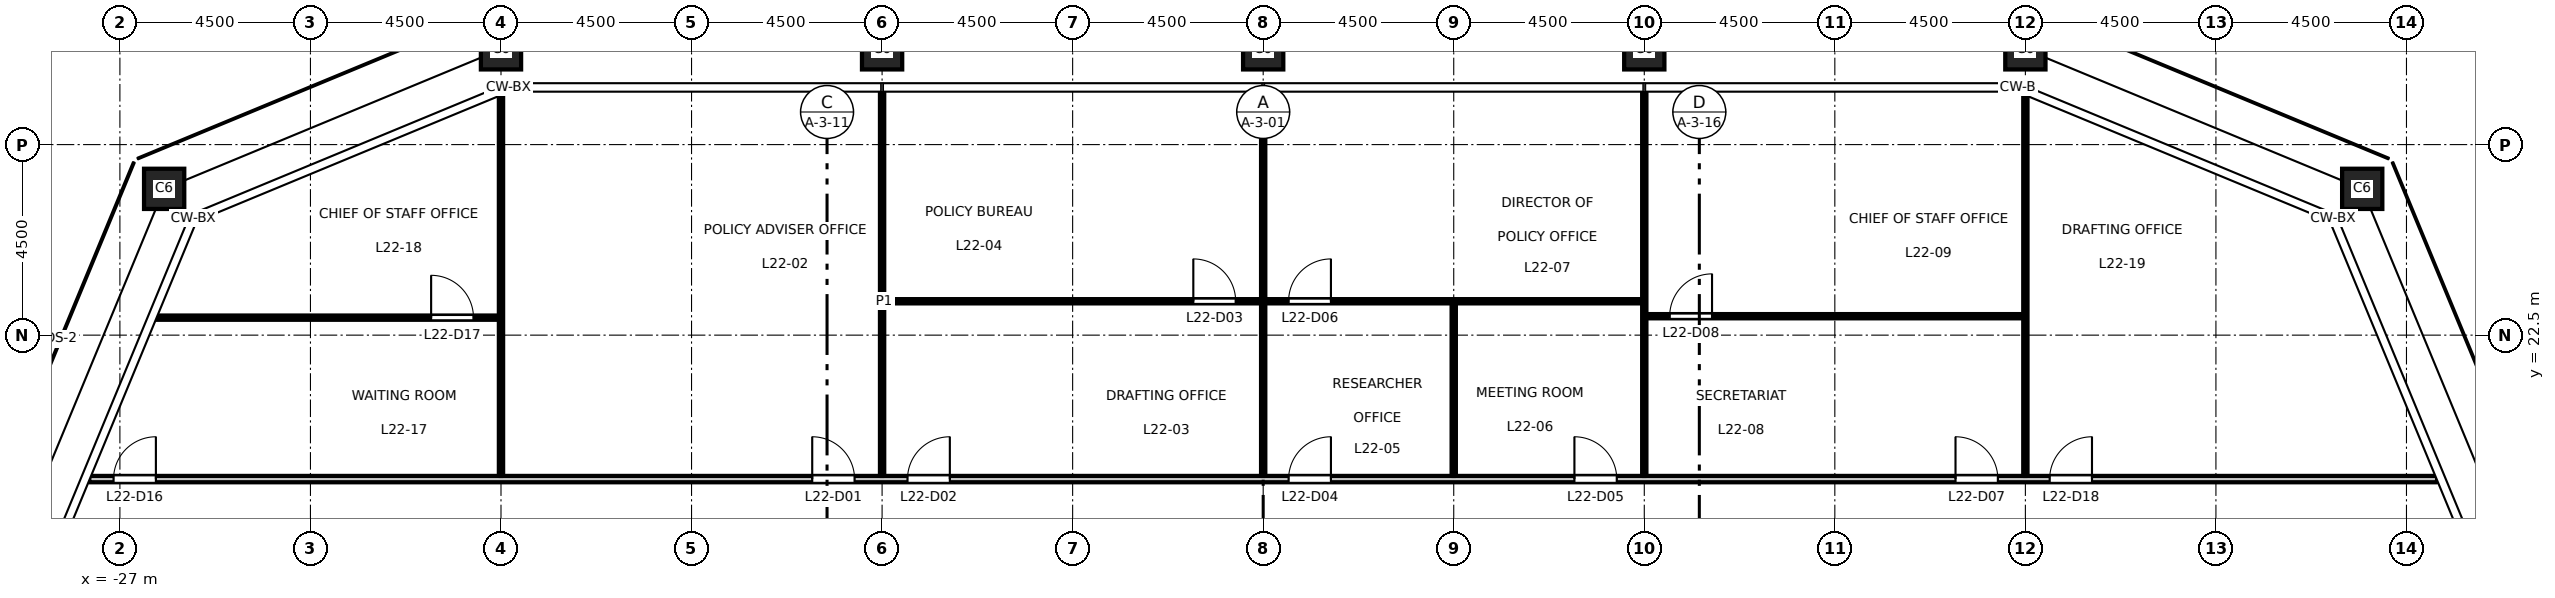
"""IFC4 building model, lengths in metres.
Left out: names, types, materials, properties, quantities, classifications, styles, units other than length and angle.
Written with IfcOpenShell. Run it as: python <this file> out.ifc"""

import sys

from ifc_helpers import new_model, si_unit, direction, frame, frame_2d, origin, origin_2d, place, context, subcontext, project, spatial, rectangle, hollow_rectangle, extrude, element, fill, save


model = new_model("IFC4")
c1 = context("Model", 3, precision=1e-05, world=origin(), true_north=direction((0.0, 1.0)))
c2 = subcontext(c1, "Body", "Model", "MODEL_VIEW")
j1 = project(units=[si_unit("LENGTHUNIT", "METRE"), si_unit("PLANEANGLEUNIT", "RADIAN")], contexts=[c1])
p1 = place(None, origin())
s1 = spatial("IfcSite", under=j1, at=p1, CompositionType="ELEMENT")
p2 = place(p1, origin())
s2 = spatial("IfcBuilding", under=s1, at=p2, CompositionType="ELEMENT")
p3 = place(p2, frame((0.0, 0.0, 104.7)))
s3 = spatial("IfcBuildingStorey", under=s2, at=p3, CompositionType="ELEMENT", Elevation=104.7)
for number, where, z_axis, x_axis in (
    (1, (25.955, 25.955, 0.0), (0.0, 0.0, 1.0), (1.0, 0.0, 0.0)),
    (2, (18.0, 29.25, 0.0), (0.0, 0.0, 1.0), (1.0, 0.0, 0.0)),
    (3, (9.0, 29.25, 0.0), (0.0, 0.0, 1.0), (1.0, 0.0, 0.0)),
    (4, (0.0, 29.25, 0.0), (0.0, 0.0, 1.0), (1.0, 0.0, 0.0)),
    (5, (-9.0, 29.25, 0.0), (0.0, 0.0, 1.0), (1.0, 0.0, 0.0)),
    (6, (-18.0, 29.25, 0.0), (0.0, 0.0, 1.0), (1.0, 0.0, 0.0)),
    (7, (-25.955, 25.955, 0.0), (0.0, 0.0, 1.0), (1.0, 0.0, 0.0)),
):
    element("IfcColumn", number, at=place(p3, frame(where, z_axis=z_axis, x_axis=x_axis)), inside=s3, PredefinedType="COLUMN", context=c2, shape_type="SweptSolid", body=[
        extrude(hollow_rectangle(XDim=0.95, YDim=0.95, WallThickness=0.055, at=origin_2d()), origin(), (0.0, 0.0, 1.0), 4.5),
    ])
p4 = place(p3, frame((-27.723, 19.1, 0.0), z_axis=(0.0, 0.0, 1.0), x_axis=(1.0, 0.0, 0.0)))
e8 = element("IfcWall", 8, at=p4, inside=s3, PredefinedType="PARTITIONING", context=c2, shape_type="SweptSolid", body=[
    extrude(rectangle(XDim=55.446, YDim=0.15, at=frame_2d((27.723, 0.0))), origin(), (0.0, 0.0, 1.0), 4.35),
])
p5 = place(p4, frame((17.073, 0.0, 0.0)))
e9 = element("IfcOpeningElement", 9, at=p5, cuts=e8, PredefinedType="OPENING", context=c2, shape_type="SweptSolid", body=[
    extrude(rectangle(XDim=1.0, YDim=2.1, at=frame_2d((0.5, 1.05))), frame((0.0, 0.085, 0.0), z_axis=(0.0, -1.0, 0.0), x_axis=(1.0, 0.0, 0.0)), (0.0, 0.0, 1.0), 0.17),
])
p6 = place(p4, frame((19.323, 0.0, 0.0)))
e10 = element("IfcOpeningElement", 10, at=p6, cuts=e8, PredefinedType="OPENING", context=c2, shape_type="SweptSolid", body=[
    extrude(rectangle(XDim=1.0, YDim=2.1, at=frame_2d((0.5, 1.05))), frame((0.0, 0.085, 0.0), z_axis=(0.0, -1.0, 0.0), x_axis=(1.0, 0.0, 0.0)), (0.0, 0.0, 1.0), 0.17),
])
p7 = place(p4, frame((28.323, 0.0, 0.0)))
e11 = element("IfcOpeningElement", 11, at=p7, cuts=e8, PredefinedType="OPENING", context=c2, shape_type="SweptSolid", body=[
    extrude(rectangle(XDim=1.0, YDim=2.1, at=frame_2d((0.5, 1.05))), frame((0.0, 0.085, 0.0), z_axis=(0.0, -1.0, 0.0), x_axis=(1.0, 0.0, 0.0)), (0.0, 0.0, 1.0), 0.17),
])
p8 = place(p4, frame((35.073, 0.0, 0.0)))
e12 = element("IfcOpeningElement", 12, at=p8, cuts=e8, PredefinedType="OPENING", context=c2, shape_type="SweptSolid", body=[
    extrude(rectangle(XDim=1.0, YDim=2.1, at=frame_2d((0.5, 1.05))), frame((0.0, 0.085, 0.0), z_axis=(0.0, -1.0, 0.0), x_axis=(1.0, 0.0, 0.0)), (0.0, 0.0, 1.0), 0.17),
])
p9 = place(p4, frame((44.073, 0.0, 0.0)))
e13 = element("IfcOpeningElement", 13, at=p9, cuts=e8, PredefinedType="OPENING", context=c2, shape_type="SweptSolid", body=[
    extrude(rectangle(XDim=1.0, YDim=2.1, at=frame_2d((0.5, 1.05))), frame((0.0, 0.085, 0.0), z_axis=(0.0, -1.0, 0.0), x_axis=(1.0, 0.0, 0.0)), (0.0, 0.0, 1.0), 0.17),
])
p10 = place(p4, frame((0.573, 0.0, 0.0)))
e14 = element("IfcOpeningElement", 14, at=p10, cuts=e8, PredefinedType="OPENING", context=c2, shape_type="SweptSolid", body=[
    extrude(rectangle(XDim=1.0, YDim=2.1, at=frame_2d((0.5, 1.05))), frame((0.0, 0.085, 0.0), z_axis=(0.0, -1.0, 0.0), x_axis=(1.0, 0.0, 0.0)), (0.0, 0.0, 1.0), 0.17),
])
p11 = place(p4, frame((46.296, 0.0, 0.0)))
e15 = element("IfcOpeningElement", 15, at=p11, cuts=e8, PredefinedType="OPENING", context=c2, shape_type="SweptSolid", body=[
    extrude(rectangle(XDim=1.0, YDim=2.1, at=frame_2d((0.5, 1.05))), frame((0.0, 0.085, 0.0), z_axis=(0.0, -1.0, 0.0), x_axis=(1.0, 0.0, 0.0)), (0.0, 0.0, 1.0), 0.17),
])
p12 = place(p3, frame((-26.143, 22.913, 0.0), z_axis=(0.0, 0.0, 1.0), x_axis=(1.0, 0.0, 0.0)))
e16 = element("IfcWall", 16, at=p12, inside=s3, PredefinedType="PARTITIONING", context=c2, shape_type="SweptSolid", body=[
    extrude(rectangle(XDim=8.093, YDim=0.1, at=frame_2d((4.046, 0.0))), origin(), (0.0, 0.0, 1.0), 4.35),
])
p13 = place(p12, frame((6.493, 0.0, 0.0)))
e17 = element("IfcOpeningElement", 17, at=p13, cuts=e16, PredefinedType="OPENING", context=c2, shape_type="SweptSolid", body=[
    extrude(rectangle(XDim=1.0, YDim=2.1, at=frame_2d((0.5, 1.05))), frame((0.0, 0.06, 0.0), z_axis=(0.0, -1.0, 0.0), x_axis=(1.0, 0.0, 0.0)), (0.0, 0.0, 1.0), 0.12),
])
p14 = place(p3, frame((9.05, 22.947, 0.0), z_axis=(0.0, 0.0, 1.0), x_axis=(1.0, 0.0, 0.0)))
e18 = element("IfcWall", 18, at=p14, inside=s3, PredefinedType="PARTITIONING", context=c2, shape_type="SweptSolid", body=[
    extrude(rectangle(XDim=8.9, YDim=0.1, at=frame_2d((4.45, 0.0))), origin(), (0.0, 0.0, 1.0), 4.35),
])
p15 = place(p14, frame((0.55, 0.0, 0.0)))
e19 = element("IfcOpeningElement", 19, at=p15, cuts=e18, PredefinedType="OPENING", context=c2, shape_type="SweptSolid", body=[
    extrude(rectangle(XDim=1.0, YDim=2.1, at=frame_2d((0.5, 1.05))), frame((0.0, 0.06, 0.0), z_axis=(0.0, -1.0, 0.0), x_axis=(1.0, 0.0, 0.0)), (0.0, 0.0, 1.0), 0.12),
])
p16 = place(p3, frame((-8.95, 23.3, 0.0), z_axis=(0.0, 0.0, 1.0), x_axis=(1.0, 0.0, 0.0)))
e20 = element("IfcWall", 20, at=p16, inside=s3, PredefinedType="PARTITIONING", context=c2, shape_type="SweptSolid", body=[
    extrude(rectangle(XDim=17.9, YDim=0.1, at=frame_2d((8.95, 0.0))), origin(), (0.0, 0.0, 1.0), 4.35),
])
p17 = place(p16, frame((7.3, 0.0, 0.0)))
e21 = element("IfcOpeningElement", 21, at=p17, cuts=e20, PredefinedType="OPENING", context=c2, shape_type="SweptSolid", body=[
    extrude(rectangle(XDim=1.0, YDim=2.1, at=frame_2d((0.5, 1.05))), frame((0.0, 0.06, 0.0), z_axis=(0.0, -1.0, 0.0), x_axis=(1.0, 0.0, 0.0)), (0.0, 0.0, 1.0), 0.12),
])
p18 = place(p16, frame((9.55, 0.0, 0.0)))
e22 = element("IfcOpeningElement", 22, at=p18, cuts=e20, PredefinedType="OPENING", context=c2, shape_type="SweptSolid", body=[
    extrude(rectangle(XDim=1.0, YDim=2.1, at=frame_2d((0.5, 1.05))), frame((0.0, 0.06, 0.0), z_axis=(0.0, -1.0, 0.0), x_axis=(1.0, 0.0, 0.0)), (0.0, 0.0, 1.0), 0.12),
])
p19 = place(p3, frame((-18.0, 19.175, 0.0), z_axis=(0.0, 0.0, 1.0), x_axis=(0.0, 1.0, 0.0)))
e23 = element("IfcWall", 23, at=p19, inside=s3, PredefinedType="PARTITIONING", context=c2, shape_type="SweptSolid", body=[
    extrude(rectangle(XDim=9.003, YDim=0.1, at=frame_2d((4.501, 0.0))), origin(), (0.0, 0.0, 1.0), 3.45),
])
p20 = place(p3, frame((-9.0, 19.175, 0.0), z_axis=(0.0, 0.0, 1.0), x_axis=(0.0, 1.0, 0.0)))
e24 = element("IfcWall", 24, at=p20, inside=s3, PredefinedType="PARTITIONING", context=c2, shape_type="SweptSolid", body=[
    extrude(rectangle(XDim=9.085, YDim=0.1, at=frame_2d((4.542, 0.0))), origin(), (0.0, 0.0, 1.0), 3.45),
])
p21 = place(p3, frame((0.0, 19.175, 0.0), z_axis=(0.0, 0.0, 1.0), x_axis=(0.0, 1.0, 0.0)))
e25 = element("IfcWall", 25, at=p21, inside=s3, PredefinedType="PARTITIONING", context=c2, shape_type="SweptSolid", body=[
    extrude(rectangle(XDim=4.075, YDim=0.1, at=frame_2d((2.038, 0.0))), origin(), (0.0, 0.0, 1.0), 3.45),
])
p22 = place(p3, frame((0.0, 23.35, 0.0), z_axis=(0.0, 0.0, 1.0), x_axis=(0.0, 1.0, 0.0)))
e26 = element("IfcWall", 26, at=p22, inside=s3, PredefinedType="PARTITIONING", context=c2, shape_type="SweptSolid", body=[
    extrude(rectangle(XDim=4.91, YDim=0.1, at=frame_2d((2.455, 0.0))), origin(), (0.0, 0.0, 1.0), 3.45),
])
p23 = place(p3, frame((4.5, 19.175, 0.0), z_axis=(0.0, 0.0, 1.0), x_axis=(0.0, 1.0, 0.0)))
e27 = element("IfcWall", 27, at=p23, inside=s3, PredefinedType="PARTITIONING", context=c2, shape_type="SweptSolid", body=[
    extrude(rectangle(XDim=4.075, YDim=0.1, at=frame_2d((2.038, 0.0))), origin(), (0.0, 0.0, 1.0), 4.35),
])
p24 = place(p3, frame((9.0, 19.175, 0.0), z_axis=(0.0, 0.0, 1.0), x_axis=(0.0, 1.0, 0.0)))
e28 = element("IfcWall", 28, at=p24, inside=s3, PredefinedType="PARTITIONING", context=c2, shape_type="SweptSolid", body=[
    extrude(rectangle(XDim=9.085, YDim=0.1, at=frame_2d((4.542, 0.0))), origin(), (0.0, 0.0, 1.0), 3.45),
])
p25 = place(p3, frame((18.0, 19.175, 0.0), z_axis=(0.0, 0.0, 1.0), x_axis=(0.0, 1.0, 0.0)))
e29 = element("IfcWall", 29, at=p25, inside=s3, PredefinedType="PARTITIONING", context=c2, shape_type="SweptSolid", body=[
    extrude(rectangle(XDim=9.003, YDim=0.1, at=frame_2d((4.501, 0.0))), origin(), (0.0, 0.0, 1.0), 3.45),
])
p26 = place(p5, origin())
e30 = element("IfcDoor", 30, at=p26, inside=s3, OperationType="SINGLE_SWING_LEFT", PredefinedType="DOOR", context=c2, shape_type="SweptSolid", body=[
    extrude(rectangle(XDim=1.0, YDim=2.1, at=frame_2d((0.5, 1.05))), frame((0.0, 0.025, 0.0), z_axis=(0.0, -1.0, 0.0), x_axis=(1.0, 0.0, 0.0)), (0.0, 0.0, 1.0), 0.05),
])
fill(e9, e30)
p27 = place(p6, origin())
e31 = element("IfcDoor", 31, at=p27, inside=s3, OperationType="SINGLE_SWING_RIGHT", PredefinedType="DOOR", context=c2, shape_type="SweptSolid", body=[
    extrude(rectangle(XDim=1.0, YDim=2.1, at=frame_2d((0.5, 1.05))), frame((0.0, 0.025, 0.0), z_axis=(0.0, -1.0, 0.0), x_axis=(1.0, 0.0, 0.0)), (0.0, 0.0, 1.0), 0.05),
])
fill(e10, e31)
p28 = place(p17, origin())
e32 = element("IfcDoor", 32, at=p28, inside=s3, OperationType="SINGLE_SWING_LEFT", PredefinedType="DOOR", context=c2, shape_type="SweptSolid", body=[
    extrude(rectangle(XDim=1.0, YDim=2.1, at=frame_2d((0.5, 1.05))), frame((0.0, 0.025, 0.0), z_axis=(0.0, -1.0, 0.0), x_axis=(1.0, 0.0, 0.0)), (0.0, 0.0, 1.0), 0.05),
])
fill(e21, e32)
p29 = place(p7, origin())
e33 = element("IfcDoor", 33, at=p29, inside=s3, OperationType="SINGLE_SWING_RIGHT", PredefinedType="DOOR", context=c2, shape_type="SweptSolid", body=[
    extrude(rectangle(XDim=1.0, YDim=2.1, at=frame_2d((0.5, 1.05))), frame((0.0, 0.025, 0.0), z_axis=(0.0, -1.0, 0.0), x_axis=(1.0, 0.0, 0.0)), (0.0, 0.0, 1.0), 0.05),
])
fill(e11, e33)
p30 = place(p8, origin())
e34 = element("IfcDoor", 34, at=p30, inside=s3, OperationType="SINGLE_SWING_LEFT", PredefinedType="DOOR", context=c2, shape_type="SweptSolid", body=[
    extrude(rectangle(XDim=1.0, YDim=2.1, at=frame_2d((0.5, 1.05))), frame((0.0, 0.025, 0.0), z_axis=(0.0, -1.0, 0.0), x_axis=(1.0, 0.0, 0.0)), (0.0, 0.0, 1.0), 0.05),
])
fill(e12, e34)
p31 = place(p18, origin())
e35 = element("IfcDoor", 35, at=p31, inside=s3, OperationType="SINGLE_SWING_RIGHT", PredefinedType="DOOR", context=c2, shape_type="SweptSolid", body=[
    extrude(rectangle(XDim=1.0, YDim=2.1, at=frame_2d((0.5, 1.05))), frame((0.0, 0.025, 0.0), z_axis=(0.0, -1.0, 0.0), x_axis=(1.0, 0.0, 0.0)), (0.0, 0.0, 1.0), 0.05),
])
fill(e22, e35)
p32 = place(p9, origin())
e36 = element("IfcDoor", 36, at=p32, inside=s3, OperationType="SINGLE_SWING_LEFT", PredefinedType="DOOR", context=c2, shape_type="SweptSolid", body=[
    extrude(rectangle(XDim=1.0, YDim=2.1, at=frame_2d((0.5, 1.05))), frame((0.0, 0.025, 0.0), z_axis=(0.0, -1.0, 0.0), x_axis=(1.0, 0.0, 0.0)), (0.0, 0.0, 1.0), 0.05),
])
fill(e13, e36)
p33 = place(p15, origin())
e37 = element("IfcDoor", 37, at=p33, inside=s3, OperationType="SINGLE_SWING_RIGHT", PredefinedType="DOOR", context=c2, shape_type="SweptSolid", body=[
    extrude(rectangle(XDim=1.0, YDim=2.1, at=frame_2d((0.5, 1.05))), frame((0.0, 0.025, 0.0), z_axis=(0.0, -1.0, 0.0), x_axis=(1.0, 0.0, 0.0)), (0.0, 0.0, 1.0), 0.05),
])
fill(e19, e37)
p34 = place(p10, origin())
e38 = element("IfcDoor", 38, at=p34, inside=s3, OperationType="SINGLE_SWING_RIGHT", PredefinedType="DOOR", context=c2, shape_type="SweptSolid", body=[
    extrude(rectangle(XDim=1.0, YDim=2.1, at=frame_2d((0.5, 1.05))), frame((0.0, 0.025, 0.0), z_axis=(0.0, -1.0, 0.0), x_axis=(1.0, 0.0, 0.0)), (0.0, 0.0, 1.0), 0.05),
])
fill(e14, e38)
p35 = place(p13, origin())
e39 = element("IfcDoor", 39, at=p35, inside=s3, OperationType="SINGLE_SWING_LEFT", PredefinedType="DOOR", context=c2, shape_type="SweptSolid", body=[
    extrude(rectangle(XDim=1.0, YDim=2.1, at=frame_2d((0.5, 1.05))), frame((0.0, 0.025, 0.0), z_axis=(0.0, -1.0, 0.0), x_axis=(1.0, 0.0, 0.0)), (0.0, 0.0, 1.0), 0.05),
])
fill(e17, e39)
p36 = place(p11, origin())
e40 = element("IfcDoor", 40, at=p36, inside=s3, OperationType="SINGLE_SWING_RIGHT", PredefinedType="DOOR", context=c2, shape_type="SweptSolid", body=[
    extrude(rectangle(XDim=1.0, YDim=2.1, at=frame_2d((0.5, 1.05))), frame((0.0, 0.025, 0.0), z_axis=(0.0, -1.0, 0.0), x_axis=(1.0, 0.0, 0.0)), (0.0, 0.0, 1.0), 0.05),
])
fill(e15, e40)
save(model, sys.argv[1])
